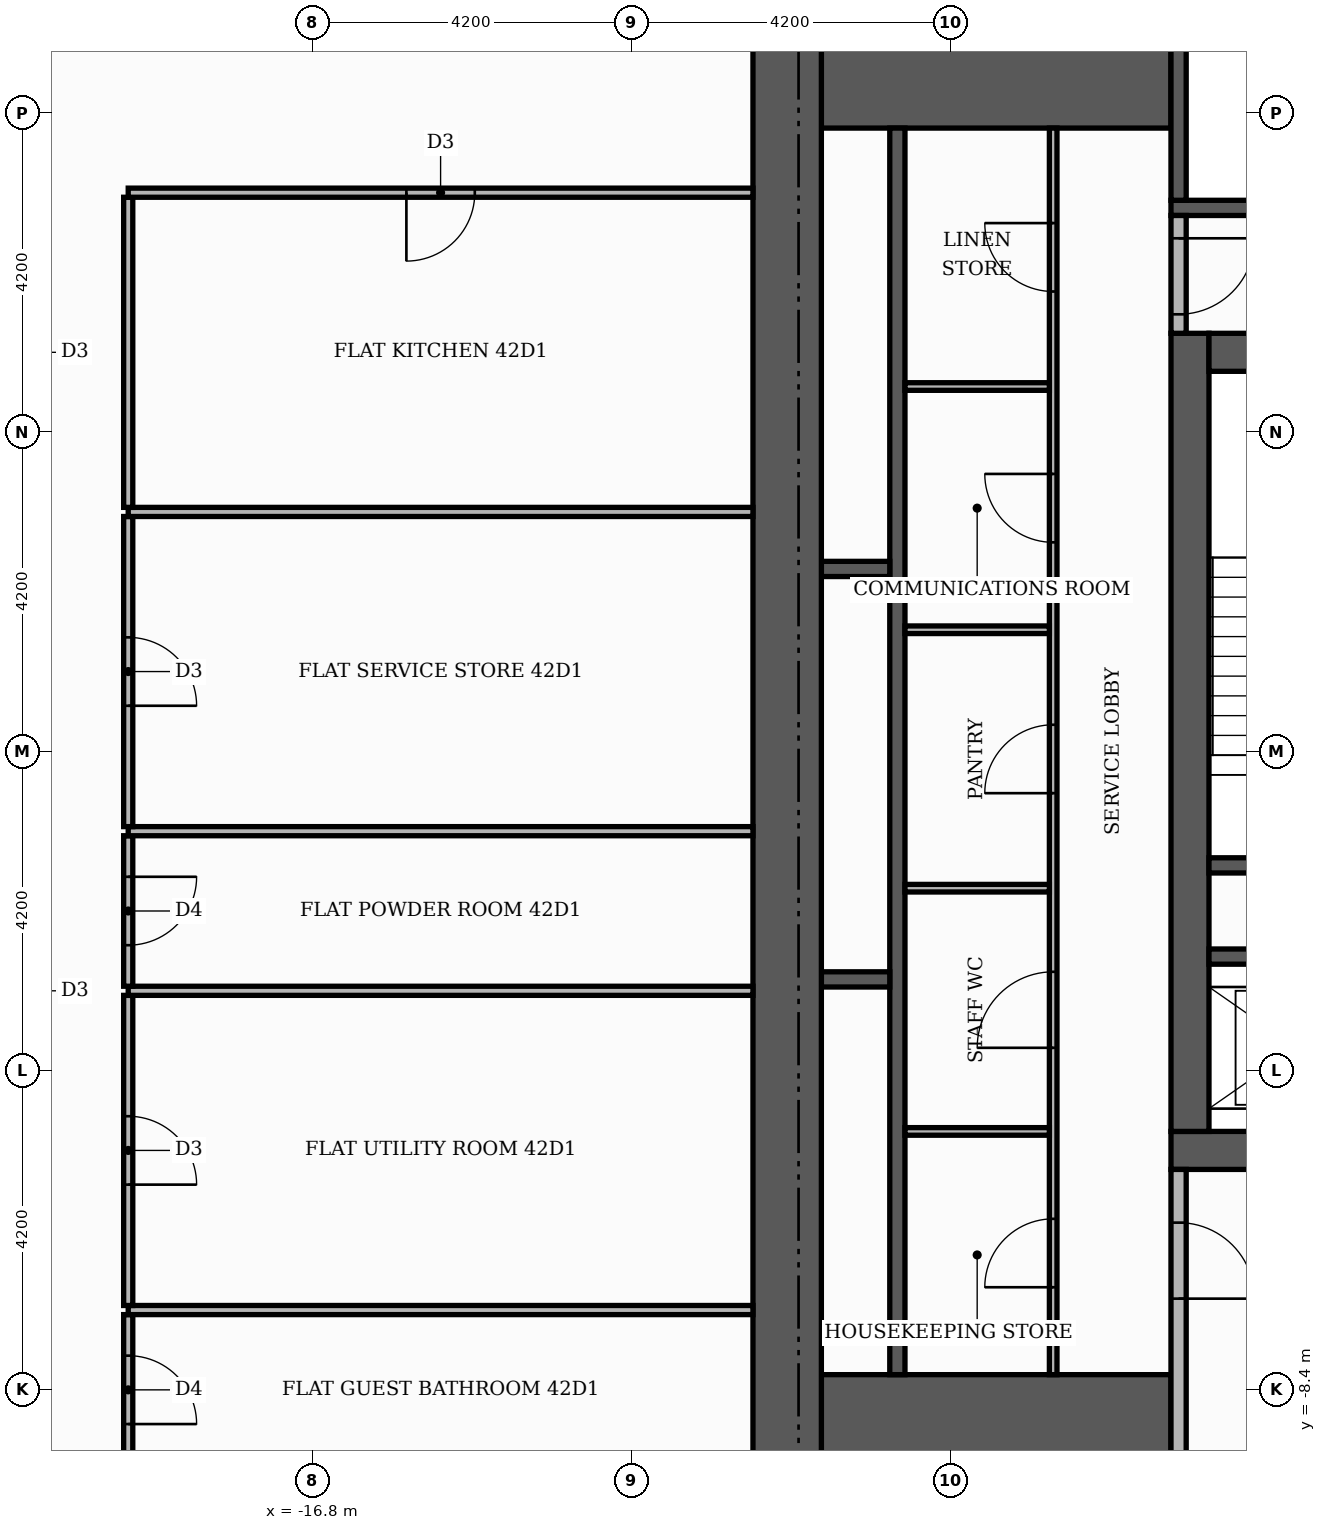
"""IFC4 building model, lengths in metres.
Left out: names, types, materials, properties, quantities, classifications, styles, units other than length and angle.
Written with IfcOpenShell. Run it as: python <this file> out.ifc"""

import sys

from ifc_helpers import new_model, si_unit, direction, frame, frame_2d, origin, place, context, subcontext, project, spatial, rectangle, extrude, element, fill, save


model = new_model("IFC4")
c1 = context("Model", 3, precision=1e-05, world=origin(), true_north=direction((0.0, 1.0)))
c2 = subcontext(c1, "Body", "Model", "MODEL_VIEW")
j1 = project(units=[si_unit("LENGTHUNIT", "METRE"), si_unit("PLANEANGLEUNIT", "RADIAN")], contexts=[c1])
p1 = place(None, origin())
s1 = spatial("IfcSite", under=j1, at=p1, CompositionType="ELEMENT")
p2 = place(p1, origin())
s2 = spatial("IfcBuilding", under=s1, at=p2, CompositionType="ELEMENT")
p3 = place(p2, frame((0.0, 0.0, 176.7)))
s3 = spatial("IfcBuildingStorey", under=s2, at=p3, CompositionType="ELEMENT", Elevation=176.7)
p4 = place(p3, frame((-5.5, -5.25, 0.0), z_axis=(0.0, 0.0, 1.0), x_axis=(1.0, 0.0, 0.0)))
e1 = element("IfcWall", 1, at=p4, inside=s3, PredefinedType="SHEAR", context=c2, shape_type="SweptSolid", body=[
    extrude(rectangle(XDim=11.0, YDim=0.5, at=frame_2d((5.5, 0.0))), origin(), (0.0, 0.0, 1.0), 3.4),
])
p5 = place(p4, frame((4.9, 0.0, 0.0)))
e2 = element("IfcOpeningElement", 2, at=p5, cuts=e1, PredefinedType="OPENING", context=c2, shape_type="SweptSolid", body=[
    extrude(rectangle(XDim=1.2, YDim=2.1, at=frame_2d((0.6, 1.05))), frame((0.0, 0.26, 0.0), z_axis=(0.0, -1.0, 0.0), x_axis=(1.0, 0.0, 0.0)), (0.0, 0.0, 1.0), 0.52),
])
p6 = place(p3, frame((-5.25, -5.0, 0.0), z_axis=(0.0, 0.0, 1.0), x_axis=(0.0, 1.0, 0.0)))
e3 = element("IfcWall", 3, at=p6, inside=s3, PredefinedType="SHEAR", context=c2, shape_type="SweptSolid", body=[
    extrude(rectangle(XDim=10.5, YDim=0.5, at=frame_2d((5.25, 0.0))), origin(), (0.0, 0.0, 1.0), 3.4),
])
p7 = place(p3, frame((-5.0, 5.25, 0.0), z_axis=(0.0, 0.0, 1.0), x_axis=(1.0, 0.0, 0.0)))
e4 = element("IfcWall", 4, at=p7, inside=s3, PredefinedType="SHEAR", context=c2, shape_type="SweptSolid", body=[
    extrude(rectangle(XDim=10.0, YDim=0.5, at=frame_2d((5.0, 0.0))), origin(), (0.0, 0.0, 1.0), 3.4),
])
p8 = place(p7, frame((4.4, 0.0, 0.0)))
e5 = element("IfcOpeningElement", 5, at=p8, cuts=e4, PredefinedType="OPENING", context=c2, shape_type="SweptSolid", body=[
    extrude(rectangle(XDim=1.2, YDim=2.1, at=frame_2d((0.6, 1.05))), frame((0.0, 0.26, 0.0), z_axis=(0.0, -1.0, 0.0), x_axis=(1.0, 0.0, 0.0)), (0.0, 0.0, 1.0), 0.52),
])
for number, where, z_axis, x_axis in (
    (6, (-10.1, -9.15, 0.0), (0.0, 0.0, 1.0), (1.0, 0.0, 0.0)),
    (7, (-10.1, 9.15, 0.0), (0.0, 0.0, 1.0), (1.0, 0.0, 0.0)),
):
    element("IfcWall", number, at=place(p3, frame(where, z_axis=z_axis, x_axis=x_axis)), inside=s3, PredefinedType="SHEAR", context=c2, shape_type="SweptSolid", body=[
        extrude(rectangle(XDim=4.6, YDim=1.9, at=frame_2d((2.3, 0.0))), origin(), (0.0, 0.0, 1.0), 3.4),
    ])
p9 = place(p3, frame((-5.0, -1.5, 0.0), z_axis=(0.0, 0.0, 1.0), x_axis=(1.0, 0.0, 0.0)))
e8 = element("IfcWall", 8, at=p9, inside=s3, PredefinedType="SHEAR", context=c2, shape_type="SweptSolid", body=[
    extrude(rectangle(XDim=3.05, YDim=0.2, at=frame_2d((1.525, 0.0))), origin(), (0.0, 0.0, 1.0), 3.4),
])
p10 = place(p3, frame((-5.5, 7.15, 0.0), z_axis=(0.0, 0.0, 1.0), x_axis=(1.0, 0.0, 0.0)))
e9 = element("IfcWall", 9, at=p10, inside=s3, PredefinedType="SHEAR", context=c2, shape_type="SweptSolid", body=[
    extrude(rectangle(XDim=6.8, YDim=0.2, at=frame_2d((3.4, 0.0))), origin(), (0.0, 0.0, 1.0), 3.4),
])
p11 = place(p3, frame((-5.4, 7.25, 0.0), z_axis=(0.0, 0.0, 1.0), x_axis=(0.0, 1.0, 0.0)))
e10 = element("IfcWall", 10, at=p11, inside=s3, PredefinedType="SHEAR", context=c2, shape_type="SweptSolid", body=[
    extrude(rectangle(XDim=2.85, YDim=0.2, at=frame_2d((1.425, 0.0))), origin(), (0.0, 0.0, 1.0), 3.4),
])
p12 = place(p3, frame((-9.1, -8.2, 0.0), z_axis=(0.0, 0.0, 1.0), x_axis=(0.0, 1.0, 0.0)))
e11 = element("IfcWall", 11, at=p12, inside=s3, PredefinedType="SHEAR", context=c2, shape_type="SweptSolid", body=[
    extrude(rectangle(XDim=16.4, YDim=0.2, at=frame_2d((8.2, 0.0))), origin(), (0.0, 0.0, 1.0), 3.4),
])
p13 = place(p3, frame((-10.1, -3.0, 0.0), z_axis=(0.0, 0.0, 1.0), x_axis=(1.0, 0.0, 0.0)))
e12 = element("IfcWall", 12, at=p13, inside=s3, PredefinedType="SHEAR", context=c2, shape_type="SweptSolid", body=[
    extrude(rectangle(XDim=0.9, YDim=0.2, at=frame_2d((0.45, 0.0))), origin(), (0.0, 0.0, 1.0), 3.4),
])
p14 = place(p3, frame((-5.0, -2.7, 0.0), z_axis=(0.0, 0.0, 1.0), x_axis=(1.0, 0.0, 0.0)))
e13 = element("IfcWall", 13, at=p14, inside=s3, PredefinedType="SHEAR", context=c2, shape_type="SweptSolid", body=[
    extrude(rectangle(XDim=2.85, YDim=0.2, at=frame_2d((1.425, 0.0))), origin(), (0.0, 0.0, 1.0), 3.4),
])
p15 = place(p3, frame((-10.1, 2.4, 0.0), z_axis=(0.0, 0.0, 1.0), x_axis=(1.0, 0.0, 0.0)))
e14 = element("IfcWall", 14, at=p15, inside=s3, PredefinedType="SHEAR", context=c2, shape_type="SweptSolid", body=[
    extrude(rectangle(XDim=0.9, YDim=0.2, at=frame_2d((0.45, 0.0))), origin(), (0.0, 0.0, 1.0), 3.4),
])
p16 = place(p3, frame((-10.55, -10.1, 0.0), z_axis=(0.0, 0.0, 1.0), x_axis=(0.0, 1.0, 0.0)))
e15 = element("IfcWall", 15, at=p16, inside=s3, PredefinedType="SHEAR", context=c2, shape_type="SweptSolid", body=[
    extrude(rectangle(XDim=20.2, YDim=0.9, at=frame_2d((10.1, 0.0))), origin(), (0.0, 0.0, 1.0), 3.4),
])
p17 = place(p3, frame((-5.4, -10.1, 0.0), z_axis=(0.0, 0.0, 1.0), x_axis=(0.0, 1.0, 0.0)))
e16 = element("IfcWall", 16, at=p17, inside=s3, PredefinedType="PARTITIONING", context=c2, shape_type="SweptSolid", body=[
    extrude(rectangle(XDim=4.6, YDim=0.2, at=frame_2d((2.3, 0.0))), origin(), (0.0, 0.0, 1.0), 3.4),
])
p18 = place(p17, frame((2.9, 0.0, 0.0)))
e17 = element("IfcOpeningElement", 17, at=p18, cuts=e16, PredefinedType="OPENING", context=c2, shape_type="SweptSolid", body=[
    extrude(rectangle(XDim=1.0, YDim=2.1, at=frame_2d((0.5, 1.05))), frame((0.0, 0.11, 0.0), z_axis=(0.0, -1.0, 0.0), x_axis=(1.0, 0.0, 0.0)), (0.0, 0.0, 1.0), 0.22),
])
p19 = place(p3, frame((-7.05, -8.2, 0.0), z_axis=(0.0, 0.0, 1.0), x_axis=(0.0, 1.0, 0.0)))
e18 = element("IfcWall", 18, at=p19, inside=s3, PredefinedType="PARTITIONING", context=c2, shape_type="SweptSolid", body=[
    extrude(rectangle(XDim=16.4, YDim=0.1, at=frame_2d((8.2, 0.0))), origin(), (0.0, 0.0, 1.0), 3.4),
])
p20 = place(p19, frame((1.15, 0.0, 0.0)))
e19 = element("IfcOpeningElement", 19, at=p20, cuts=e18, PredefinedType="OPENING", context=c2, shape_type="SweptSolid", body=[
    extrude(rectangle(XDim=0.9, YDim=2.1, at=frame_2d((0.45, 1.05))), frame((0.0, 0.06, 0.0), z_axis=(0.0, -1.0, 0.0), x_axis=(1.0, 0.0, 0.0)), (0.0, 0.0, 1.0), 0.12),
])
p21 = place(p19, frame((4.3, 0.0, 0.0)))
e20 = element("IfcOpeningElement", 20, at=p21, cuts=e18, PredefinedType="OPENING", context=c2, shape_type="SweptSolid", body=[
    extrude(rectangle(XDim=1.0, YDim=2.1, at=frame_2d((0.5, 1.05))), frame((0.0, 0.06, 0.0), z_axis=(0.0, -1.0, 0.0), x_axis=(1.0, 0.0, 0.0)), (0.0, 0.0, 1.0), 0.12),
])
p22 = place(p19, frame((7.65, 0.0, 0.0)))
e21 = element("IfcOpeningElement", 21, at=p22, cuts=e18, PredefinedType="OPENING", context=c2, shape_type="SweptSolid", body=[
    extrude(rectangle(XDim=0.9, YDim=2.1, at=frame_2d((0.45, 1.05))), frame((0.0, 0.06, 0.0), z_axis=(0.0, -1.0, 0.0), x_axis=(1.0, 0.0, 0.0)), (0.0, 0.0, 1.0), 0.12),
])
p23 = place(p19, frame((10.95, 0.0, 0.0)))
e22 = element("IfcOpeningElement", 22, at=p23, cuts=e18, PredefinedType="OPENING", context=c2, shape_type="SweptSolid", body=[
    extrude(rectangle(XDim=0.9, YDim=2.1, at=frame_2d((0.45, 1.05))), frame((0.0, 0.06, 0.0), z_axis=(0.0, -1.0, 0.0), x_axis=(1.0, 0.0, 0.0)), (0.0, 0.0, 1.0), 0.12),
])
p24 = place(p19, frame((14.25, 0.0, 0.0)))
e23 = element("IfcOpeningElement", 23, at=p24, cuts=e18, PredefinedType="OPENING", context=c2, shape_type="SweptSolid", body=[
    extrude(rectangle(XDim=0.9, YDim=2.1, at=frame_2d((0.45, 1.05))), frame((0.0, 0.06, 0.0), z_axis=(0.0, -1.0, 0.0), x_axis=(1.0, 0.0, 0.0)), (0.0, 0.0, 1.0), 0.12),
])
for number, where, z_axis, x_axis in (
    (24, (-9.0, -5.0, 0.0), (0.0, 0.0, 1.0), (1.0, 0.0, 0.0)),
    (25, (-9.0, -1.8, 0.0), (0.0, 0.0, 1.0), (1.0, 0.0, 0.0)),
    (26, (-9.0, 1.6, 0.0), (0.0, 0.0, 1.0), (1.0, 0.0, 0.0)),
    (27, (-9.0, 4.8, 0.0), (0.0, 0.0, 1.0), (1.0, 0.0, 0.0)),
):
    element("IfcWall", number, at=place(p3, frame(where, z_axis=z_axis, x_axis=x_axis)), inside=s3, PredefinedType="PARTITIONING", context=c2, shape_type="SweptSolid", body=[
        extrude(rectangle(XDim=1.9, YDim=0.1, at=frame_2d((0.95, 0.0))), origin(), (0.0, 0.0, 1.0), 3.4),
    ])
p25 = place(p3, frame((-5.4, 5.5, 0.0), z_axis=(0.0, 0.0, 1.0), x_axis=(0.0, 1.0, 0.0)))
e28 = element("IfcWall", 28, at=p25, inside=s3, PredefinedType="PARTITIONING", context=c2, shape_type="SweptSolid", body=[
    extrude(rectangle(XDim=1.55, YDim=0.2, at=frame_2d((0.775, 0.0))), origin(), (0.0, 0.0, 1.0), 3.4),
])
p26 = place(p25, frame((0.25, 0.0, 0.0)))
e29 = element("IfcOpeningElement", 29, at=p26, cuts=e28, PredefinedType="OPENING", context=c2, shape_type="SweptSolid", body=[
    extrude(rectangle(XDim=1.0, YDim=2.1, at=frame_2d((0.5, 1.05))), frame((0.0, 0.11, 0.0), z_axis=(0.0, -1.0, 0.0), x_axis=(1.0, 0.0, 0.0)), (0.0, 0.0, 1.0), 0.22),
])
p27 = place(p3, frame((-19.22, -9.39, 0.0), z_axis=(0.0, 0.0, 1.0), x_axis=(0.0, 1.0, 0.0)))
e30 = element("IfcWall", 30, at=p27, inside=s3, PredefinedType="PARTITIONING", context=c2, shape_type="SweptSolid", body=[
    extrude(rectangle(XDim=1.98, YDim=0.12, at=frame_2d((0.99, 0.0))), origin(), (0.0, 0.0, 1.0), 3.4),
])
p28 = place(p27, frame((0.54, 0.0, 0.0)))
e31 = element("IfcOpeningElement", 31, at=p28, cuts=e30, PredefinedType="OPENING", context=c2, shape_type="SweptSolid", body=[
    extrude(rectangle(XDim=0.9, YDim=2.1, at=frame_2d((0.45, 1.05))), frame((0.0, 0.07, 0.0), z_axis=(0.0, -1.0, 0.0), x_axis=(1.0, 0.0, 0.0)), (0.0, 0.0, 1.0), 0.14),
])
p29 = place(p3, frame((-19.22, -7.35, 0.0), z_axis=(0.0, 0.0, 1.0), x_axis=(1.0, 0.0, 0.0)))
e32 = element("IfcWall", 32, at=p29, inside=s3, PredefinedType="PARTITIONING", context=c2, shape_type="SweptSolid", body=[
    extrude(rectangle(XDim=8.22, YDim=0.12, at=frame_2d((4.11, 0.0))), origin(), (0.0, 0.0, 1.0), 3.4),
])
p30 = place(p3, frame((-19.22, -7.29, 0.0), z_axis=(0.0, 0.0, 1.0), x_axis=(0.0, 1.0, 0.0)))
e33 = element("IfcWall", 33, at=p30, inside=s3, PredefinedType="PARTITIONING", context=c2, shape_type="SweptSolid", body=[
    extrude(rectangle(XDim=4.08, YDim=0.12, at=frame_2d((2.04, 0.0))), origin(), (0.0, 0.0, 1.0), 3.4),
])
p31 = place(p30, frame((1.59, 0.0, 0.0)))
e34 = element("IfcOpeningElement", 34, at=p31, cuts=e33, PredefinedType="OPENING", context=c2, shape_type="SweptSolid", body=[
    extrude(rectangle(XDim=0.9, YDim=2.1, at=frame_2d((0.45, 1.05))), frame((0.0, 0.07, 0.0), z_axis=(0.0, -1.0, 0.0), x_axis=(1.0, 0.0, 0.0)), (0.0, 0.0, 1.0), 0.14),
])
p32 = place(p3, frame((-19.22, -3.15, 0.0), z_axis=(0.0, 0.0, 1.0), x_axis=(1.0, 0.0, 0.0)))
e35 = element("IfcWall", 35, at=p32, inside=s3, PredefinedType="PARTITIONING", context=c2, shape_type="SweptSolid", body=[
    extrude(rectangle(XDim=8.22, YDim=0.12, at=frame_2d((4.11, 0.0))), origin(), (0.0, 0.0, 1.0), 3.4),
])
p33 = place(p3, frame((-19.22, -3.09, 0.0), z_axis=(0.0, 0.0, 1.0), x_axis=(0.0, 1.0, 0.0)))
e36 = element("IfcWall", 36, at=p33, inside=s3, PredefinedType="PARTITIONING", context=c2, shape_type="SweptSolid", body=[
    extrude(rectangle(XDim=1.98, YDim=0.12, at=frame_2d((0.99, 0.0))), origin(), (0.0, 0.0, 1.0), 3.4),
])
p34 = place(p33, frame((0.54, 0.0, 0.0)))
e37 = element("IfcOpeningElement", 37, at=p34, cuts=e36, PredefinedType="OPENING", context=c2, shape_type="SweptSolid", body=[
    extrude(rectangle(XDim=0.9, YDim=2.1, at=frame_2d((0.45, 1.05))), frame((0.0, 0.07, 0.0), z_axis=(0.0, -1.0, 0.0), x_axis=(1.0, 0.0, 0.0)), (0.0, 0.0, 1.0), 0.14),
])
p35 = place(p3, frame((-19.22, -1.05, 0.0), z_axis=(0.0, 0.0, 1.0), x_axis=(1.0, 0.0, 0.0)))
e38 = element("IfcWall", 38, at=p35, inside=s3, PredefinedType="PARTITIONING", context=c2, shape_type="SweptSolid", body=[
    extrude(rectangle(XDim=8.22, YDim=0.12, at=frame_2d((4.11, 0.0))), origin(), (0.0, 0.0, 1.0), 3.4),
])
p36 = place(p3, frame((-19.22, -0.99, 0.0), z_axis=(0.0, 0.0, 1.0), x_axis=(0.0, 1.0, 0.0)))
e39 = element("IfcWall", 39, at=p36, inside=s3, PredefinedType="PARTITIONING", context=c2, shape_type="SweptSolid", body=[
    extrude(rectangle(XDim=4.08, YDim=0.12, at=frame_2d((2.04, 0.0))), origin(), (0.0, 0.0, 1.0), 3.4),
])
p37 = place(p36, frame((1.59, 0.0, 0.0)))
e40 = element("IfcOpeningElement", 40, at=p37, cuts=e39, PredefinedType="OPENING", context=c2, shape_type="SweptSolid", body=[
    extrude(rectangle(XDim=0.9, YDim=2.1, at=frame_2d((0.45, 1.05))), frame((0.0, 0.07, 0.0), z_axis=(0.0, -1.0, 0.0), x_axis=(1.0, 0.0, 0.0)), (0.0, 0.0, 1.0), 0.14),
])
p38 = place(p3, frame((-19.22, 3.15, 0.0), z_axis=(0.0, 0.0, 1.0), x_axis=(1.0, 0.0, 0.0)))
e41 = element("IfcWall", 41, at=p38, inside=s3, PredefinedType="PARTITIONING", context=c2, shape_type="SweptSolid", body=[
    extrude(rectangle(XDim=8.22, YDim=0.12, at=frame_2d((4.11, 0.0))), origin(), (0.0, 0.0, 1.0), 3.4),
])
p39 = place(p3, frame((-19.22, 3.21, 0.0), z_axis=(0.0, 0.0, 1.0), x_axis=(0.0, 1.0, 0.0)))
e42 = element("IfcWall", 42, at=p39, inside=s3, PredefinedType="PARTITIONING", context=c2, shape_type="SweptSolid", body=[
    extrude(rectangle(XDim=4.08, YDim=0.12, at=frame_2d((2.04, 0.0))), origin(), (0.0, 0.0, 1.0), 3.4),
])
p40 = place(p3, frame((-19.22, 7.35, 0.0), z_axis=(0.0, 0.0, 1.0), x_axis=(1.0, 0.0, 0.0)))
e43 = element("IfcWall", 43, at=p40, inside=s3, PredefinedType="PARTITIONING", context=c2, shape_type="SweptSolid", body=[
    extrude(rectangle(XDim=8.22, YDim=0.12, at=frame_2d((4.11, 0.0))), origin(), (0.0, 0.0, 1.0), 3.4),
])
p41 = place(p40, frame((3.66, 0.0, 0.0)))
e44 = element("IfcOpeningElement", 44, at=p41, cuts=e43, PredefinedType="OPENING", context=c2, shape_type="SweptSolid", body=[
    extrude(rectangle(XDim=0.9, YDim=2.1, at=frame_2d((0.45, 1.05))), frame((0.0, 0.07, 0.0), z_axis=(0.0, -1.0, 0.0), x_axis=(1.0, 0.0, 0.0)), (0.0, 0.0, 1.0), 0.14),
])
p42 = place(p26, frame((1.0, 0.0, 0.0), z_axis=(0.0, 0.0, 1.0), x_axis=(-1.0, 0.0, 0.0)))
e45 = element("IfcDoor", 45, at=p42, inside=s3, OperationType="SINGLE_SWING_RIGHT", PredefinedType="DOOR", context=c2, shape_type="SweptSolid", body=[
    extrude(rectangle(XDim=1.0, YDim=2.1, at=frame_2d((0.5, 1.05))), frame((0.0, 0.025, 0.0), z_axis=(0.0, -1.0, 0.0), x_axis=(1.0, 0.0, 0.0)), (0.0, 0.0, 1.0), 0.05),
])
fill(e29, e45)
p43 = place(p18, frame((1.0, 0.0, 0.0), z_axis=(0.0, 0.0, 1.0), x_axis=(-1.0, 0.0, 0.0)))
e46 = element("IfcDoor", 46, at=p43, inside=s3, OperationType="SINGLE_SWING_LEFT", PredefinedType="DOOR", context=c2, shape_type="SweptSolid", body=[
    extrude(rectangle(XDim=1.0, YDim=2.1, at=frame_2d((0.5, 1.05))), frame((0.0, 0.025, 0.0), z_axis=(0.0, -1.0, 0.0), x_axis=(1.0, 0.0, 0.0)), (0.0, 0.0, 1.0), 0.05),
])
fill(e17, e46)
p44 = place(p20, origin())
e47 = element("IfcDoor", 47, at=p44, inside=s3, OperationType="SINGLE_SWING_LEFT", PredefinedType="DOOR", context=c2, shape_type="SweptSolid", body=[
    extrude(rectangle(XDim=0.9, YDim=2.1, at=frame_2d((0.45, 1.05))), frame((0.0, 0.025, 0.0), z_axis=(0.0, -1.0, 0.0), x_axis=(1.0, 0.0, 0.0)), (0.0, 0.0, 1.0), 0.05),
])
fill(e19, e47)
p45 = place(p21, origin())
e48 = element("IfcDoor", 48, at=p45, inside=s3, OperationType="SINGLE_SWING_LEFT", PredefinedType="DOOR", context=c2, shape_type="SweptSolid", body=[
    extrude(rectangle(XDim=1.0, YDim=2.1, at=frame_2d((0.5, 1.05))), frame((0.0, 0.025, 0.0), z_axis=(0.0, -1.0, 0.0), x_axis=(1.0, 0.0, 0.0)), (0.0, 0.0, 1.0), 0.05),
])
fill(e20, e48)
p46 = place(p22, origin())
e49 = element("IfcDoor", 49, at=p46, inside=s3, OperationType="SINGLE_SWING_LEFT", PredefinedType="DOOR", context=c2, shape_type="SweptSolid", body=[
    extrude(rectangle(XDim=0.9, YDim=2.1, at=frame_2d((0.45, 1.05))), frame((0.0, 0.025, 0.0), z_axis=(0.0, -1.0, 0.0), x_axis=(1.0, 0.0, 0.0)), (0.0, 0.0, 1.0), 0.05),
])
fill(e21, e49)
p47 = place(p23, origin())
e50 = element("IfcDoor", 50, at=p47, inside=s3, OperationType="SINGLE_SWING_RIGHT", PredefinedType="DOOR", context=c2, shape_type="SweptSolid", body=[
    extrude(rectangle(XDim=0.9, YDim=2.1, at=frame_2d((0.45, 1.05))), frame((0.0, 0.025, 0.0), z_axis=(0.0, -1.0, 0.0), x_axis=(1.0, 0.0, 0.0)), (0.0, 0.0, 1.0), 0.05),
])
fill(e22, e50)
p48 = place(p24, origin())
e51 = element("IfcDoor", 51, at=p48, inside=s3, OperationType="SINGLE_SWING_RIGHT", PredefinedType="DOOR", context=c2, shape_type="SweptSolid", body=[
    extrude(rectangle(XDim=0.9, YDim=2.1, at=frame_2d((0.45, 1.05))), frame((0.0, 0.025, 0.0), z_axis=(0.0, -1.0, 0.0), x_axis=(1.0, 0.0, 0.0)), (0.0, 0.0, 1.0), 0.05),
])
fill(e23, e51)
p49 = place(p41, frame((0.9, 0.0, 0.0), z_axis=(0.0, 0.0, 1.0), x_axis=(-1.0, 0.0, 0.0)))
e52 = element("IfcDoor", 52, at=p49, inside=s3, OperationType="SINGLE_SWING_LEFT", PredefinedType="DOOR", context=c2, shape_type="SweptSolid", body=[
    extrude(rectangle(XDim=0.9, YDim=2.1, at=frame_2d((0.45, 1.05))), frame((0.0, 0.025, 0.0), z_axis=(0.0, -1.0, 0.0), x_axis=(1.0, 0.0, 0.0)), (0.0, 0.0, 1.0), 0.05),
])
fill(e44, e52)
p50 = place(p37, frame((0.9, 0.0, 0.0), z_axis=(0.0, 0.0, 1.0), x_axis=(-1.0, 0.0, 0.0)))
e53 = element("IfcDoor", 53, at=p50, inside=s3, OperationType="SINGLE_SWING_LEFT", PredefinedType="DOOR", context=c2, shape_type="SweptSolid", body=[
    extrude(rectangle(XDim=0.9, YDim=2.1, at=frame_2d((0.45, 1.05))), frame((0.0, 0.025, 0.0), z_axis=(0.0, -1.0, 0.0), x_axis=(1.0, 0.0, 0.0)), (0.0, 0.0, 1.0), 0.05),
])
fill(e40, e53)
p51 = place(p34, frame((0.9, 0.0, 0.0), z_axis=(0.0, 0.0, 1.0), x_axis=(-1.0, 0.0, 0.0)))
e54 = element("IfcDoor", 54, at=p51, inside=s3, OperationType="SINGLE_SWING_RIGHT", PredefinedType="DOOR", context=c2, shape_type="SweptSolid", body=[
    extrude(rectangle(XDim=0.9, YDim=2.1, at=frame_2d((0.45, 1.05))), frame((0.0, 0.025, 0.0), z_axis=(0.0, -1.0, 0.0), x_axis=(1.0, 0.0, 0.0)), (0.0, 0.0, 1.0), 0.05),
])
fill(e37, e54)
p52 = place(p31, frame((0.9, 0.0, 0.0), z_axis=(0.0, 0.0, 1.0), x_axis=(-1.0, 0.0, 0.0)))
e55 = element("IfcDoor", 55, at=p52, inside=s3, OperationType="SINGLE_SWING_LEFT", PredefinedType="DOOR", context=c2, shape_type="SweptSolid", body=[
    extrude(rectangle(XDim=0.9, YDim=2.1, at=frame_2d((0.45, 1.05))), frame((0.0, 0.025, 0.0), z_axis=(0.0, -1.0, 0.0), x_axis=(1.0, 0.0, 0.0)), (0.0, 0.0, 1.0), 0.05),
])
fill(e34, e55)
p53 = place(p28, frame((0.9, 0.0, 0.0), z_axis=(0.0, 0.0, 1.0), x_axis=(-1.0, 0.0, 0.0)))
e56 = element("IfcDoor", 56, at=p53, inside=s3, OperationType="SINGLE_SWING_LEFT", PredefinedType="DOOR", context=c2, shape_type="SweptSolid", body=[
    extrude(rectangle(XDim=0.9, YDim=2.1, at=frame_2d((0.45, 1.05))), frame((0.0, 0.025, 0.0), z_axis=(0.0, -1.0, 0.0), x_axis=(1.0, 0.0, 0.0)), (0.0, 0.0, 1.0), 0.05),
])
fill(e31, e56)
save(model, sys.argv[1])
